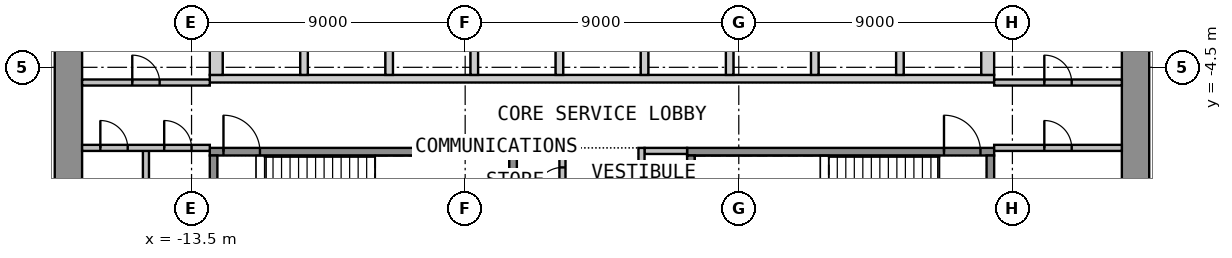
"""IFC4 building model, lengths in metres.
Left out: names, types, materials, properties, quantities, classifications, styles, units other than length and angle.
Written with IfcOpenShell. Run it as: python <this file> out.ifc"""

import sys

from ifc_helpers import new_model, si_unit, direction, frame, frame_2d, origin, place, context, subcontext, project, spatial, polyline, rectangle, outline, extrude, element, fill, save


model = new_model("IFC4")
c1 = context("Model", 3, precision=1e-05, world=origin(), true_north=direction((0.0, 1.0)))
c2 = subcontext(c1, "Body", "Model", "MODEL_VIEW")
j1 = project(units=[si_unit("LENGTHUNIT", "METRE"), si_unit("PLANEANGLEUNIT", "RADIAN")], contexts=[c1])
p1 = place(None, origin())
s1 = spatial("IfcSite", under=j1, at=p1, CompositionType="ELEMENT")
p2 = place(p1, origin())
s2 = spatial("IfcBuilding", under=s1, at=p2, CompositionType="ELEMENT")
p3 = place(p2, frame((0.0, 0.0, 10.8)))
s3 = spatial("IfcBuildingStorey", under=s2, at=p3, CompositionType="ELEMENT", Elevation=10.8)
p4 = place(p3, frame((-17.55, -12.6, 0.0), z_axis=(0.0, 0.0, 1.0), x_axis=(0.0, 1.0, 0.0)))
e1 = element("IfcWall", 1, at=p4, inside=s3, PredefinedType="SHEAR", context=c2, shape_type="SweptSolid", body=[
    extrude(rectangle(XDim=25.2, YDim=0.9, at=frame_2d((12.6, 0.0))), origin(), (0.0, 0.0, 1.0), 4.4),
])
p5 = place(p4, frame((11.4, 0.0, 0.0)))
e2 = element("IfcOpeningElement", 2, at=p5, cuts=e1, PredefinedType="OPENING", context=c2, shape_type="SweptSolid", body=[
    extrude(rectangle(XDim=2.4, YDim=2.1, at=frame_2d((1.2, 1.05))), frame((0.0, 0.46, 0.0), z_axis=(0.0, -1.0, 0.0), x_axis=(1.0, 0.0, 0.0)), (0.0, 0.0, 1.0), 0.92),
])
p6 = place(p3, frame((17.55, -12.6, 0.0), z_axis=(0.0, 0.0, 1.0), x_axis=(0.0, 1.0, 0.0)))
e3 = element("IfcWall", 3, at=p6, inside=s3, PredefinedType="SHEAR", context=c2, shape_type="SweptSolid", body=[
    extrude(rectangle(XDim=25.2, YDim=0.9, at=frame_2d((12.6, 0.0))), origin(), (0.0, 0.0, 1.0), 4.4),
])
p7 = place(p6, frame((11.4, 0.0, 0.0)))
e4 = element("IfcOpeningElement", 4, at=p7, cuts=e3, PredefinedType="OPENING", context=c2, shape_type="SweptSolid", body=[
    extrude(rectangle(XDim=2.4, YDim=2.1, at=frame_2d((1.2, 1.05))), frame((0.0, 0.46, 0.0), z_axis=(0.0, -1.0, 0.0), x_axis=(1.0, 0.0, 0.0)), (0.0, 0.0, 1.0), 0.92),
])
p8 = place(p3, origin())
e5 = element("IfcWall", 5, at=p8, inside=s3, PredefinedType="SHEAR", context=c2, shape_type="SweptSolid", body=[
    extrude(outline(polyline([(-12.9, -5.0), (12.9, -5.0), (12.9, -4.75), (-12.9, -4.75), (-12.9, -5.0)])), origin(), (0.0, 0.0, 1.0), 4.4),
])
p9 = place(p3, origin())
e6 = element("IfcWall", 6, at=p9, inside=s3, PredefinedType="SHEAR", context=c2, shape_type="SweptSolid", body=[
    extrude(outline(polyline([(-12.9, -4.75), (-12.475, -4.75), (-12.475, -2.05), (-12.9, -2.05), (-12.9, -4.75)])), origin(), (0.0, 0.0, 1.0), 4.4),
])
p10 = place(p3, origin())
e7 = element("IfcWall", 7, at=p10, inside=s3, PredefinedType="SHEAR", context=c2, shape_type="SweptSolid", body=[
    extrude(outline(polyline([(-9.925, -4.75), (-9.675, -4.75), (-9.675, -2.05), (-9.925, -2.05), (-9.925, -4.75)])), origin(), (0.0, 0.0, 1.0), 4.4),
])
p11 = place(p3, origin())
e8 = element("IfcWall", 8, at=p11, inside=s3, PredefinedType="SHEAR", context=c2, shape_type="SweptSolid", body=[
    extrude(outline(polyline([(-7.125, -4.75), (-6.875, -4.75), (-6.875, -2.05), (-7.125, -2.05), (-7.125, -4.75)])), origin(), (0.0, 0.0, 1.0), 4.4),
])
p12 = place(p3, origin())
e9 = element("IfcWall", 9, at=p12, inside=s3, PredefinedType="SHEAR", context=c2, shape_type="SweptSolid", body=[
    extrude(outline(polyline([(-4.325, -4.75), (-4.075, -4.75), (-4.075, -2.05), (-4.325, -2.05), (-4.325, -4.75)])), origin(), (0.0, 0.0, 1.0), 4.4),
])
p13 = place(p3, origin())
e10 = element("IfcWall", 10, at=p13, inside=s3, PredefinedType="SHEAR", context=c2, shape_type="SweptSolid", body=[
    extrude(outline(polyline([(-1.525, -4.75), (-1.275, -4.75), (-1.275, -2.05), (-1.525, -2.05), (-1.525, -4.75)])), origin(), (0.0, 0.0, 1.0), 4.4),
])
p14 = place(p3, origin())
e11 = element("IfcWall", 11, at=p14, inside=s3, PredefinedType="SHEAR", context=c2, shape_type="SweptSolid", body=[
    extrude(outline(polyline([(1.275, -4.75), (1.525, -4.75), (1.525, -2.05), (1.275, -2.05), (1.275, -4.75)])), origin(), (0.0, 0.0, 1.0), 4.4),
])
p15 = place(p3, origin())
e12 = element("IfcWall", 12, at=p15, inside=s3, PredefinedType="SHEAR", context=c2, shape_type="SweptSolid", body=[
    extrude(outline(polyline([(4.075, -4.75), (4.325, -4.75), (4.325, -2.05), (4.075, -2.05), (4.075, -4.75)])), origin(), (0.0, 0.0, 1.0), 4.4),
])
p16 = place(p3, origin())
e13 = element("IfcWall", 13, at=p16, inside=s3, PredefinedType="SHEAR", context=c2, shape_type="SweptSolid", body=[
    extrude(outline(polyline([(6.875, -4.75), (7.125, -4.75), (7.125, -2.05), (6.875, -2.05), (6.875, -4.75)])), origin(), (0.0, 0.0, 1.0), 4.4),
])
p17 = place(p3, origin())
e14 = element("IfcWall", 14, at=p17, inside=s3, PredefinedType="SHEAR", context=c2, shape_type="SweptSolid", body=[
    extrude(outline(polyline([(9.675, -4.75), (9.925, -4.75), (9.925, -2.05), (9.675, -2.05), (9.675, -4.75)])), origin(), (0.0, 0.0, 1.0), 4.4),
])
p18 = place(p3, origin())
e15 = element("IfcWall", 15, at=p18, inside=s3, PredefinedType="SHEAR", context=c2, shape_type="SweptSolid", body=[
    extrude(outline(polyline([(12.475, -4.75), (12.9, -4.75), (12.9, -2.05), (12.475, -2.05), (12.475, -4.75)])), origin(), (0.0, 0.0, 1.0), 4.4),
])
p19 = place(p3, frame((-12.9, -7.275, 0.0), z_axis=(0.0, 0.0, 1.0), x_axis=(1.0, 0.0, 0.0)))
e16 = element("IfcWall", 16, at=p19, inside=s3, PredefinedType="SHEAR", context=c2, shape_type="SweptSolid", body=[
    extrude(rectangle(XDim=10.1, YDim=0.25, at=frame_2d((5.05, 0.0))), origin(), (0.0, 0.0, 1.0), 4.4),
])
p20 = place(p19, frame((0.45, 0.0, 0.0)))
e17 = element("IfcOpeningElement", 17, at=p20, cuts=e16, PredefinedType="OPENING", context=c2, shape_type="SweptSolid", body=[
    extrude(rectangle(XDim=1.2, YDim=2.1, at=frame_2d((0.6, 1.05))), frame((0.0, 0.135, 0.0), z_axis=(0.0, -1.0, 0.0), x_axis=(1.0, 0.0, 0.0)), (0.0, 0.0, 1.0), 0.27),
])
for number, where, z_axis, x_axis in (
    (18, (-12.775, -10.65, 0.0), (0.0, 0.0, 1.0), (0.0, 1.0, 0.0)),
    (19, (-2.925, -10.65, 0.0), (0.0, 0.0, 1.0), (0.0, 1.0, 0.0)),
):
    element("IfcWall", number, at=place(p3, frame(where, z_axis=z_axis, x_axis=x_axis)), inside=s3, PredefinedType="SHEAR", context=c2, shape_type="SweptSolid", body=[
        extrude(rectangle(XDim=3.25, YDim=0.25, at=frame_2d((1.625, 0.0))), origin(), (0.0, 0.0, 1.0), 4.4),
    ])
p21 = place(p3, frame((2.8, -7.275, 0.0), z_axis=(0.0, 0.0, 1.0), x_axis=(1.0, 0.0, 0.0)))
e20 = element("IfcWall", 20, at=p21, inside=s3, PredefinedType="SHEAR", context=c2, shape_type="SweptSolid", body=[
    extrude(rectangle(XDim=10.1, YDim=0.25, at=frame_2d((5.05, 0.0))), origin(), (0.0, 0.0, 1.0), 4.4),
])
p22 = place(p21, frame((8.45, 0.0, 0.0)))
e21 = element("IfcOpeningElement", 21, at=p22, cuts=e20, PredefinedType="OPENING", context=c2, shape_type="SweptSolid", body=[
    extrude(rectangle(XDim=1.2, YDim=2.1, at=frame_2d((0.6, 1.05))), frame((0.0, 0.135, 0.0), z_axis=(0.0, -1.0, 0.0), x_axis=(1.0, 0.0, 0.0)), (0.0, 0.0, 1.0), 0.27),
])
for number, where, z_axis, x_axis in (
    (22, (2.925, -10.65, 0.0), (0.0, 0.0, 1.0), (0.0, 1.0, 0.0)),
    (23, (12.775, -10.65, 0.0), (0.0, 0.0, 1.0), (0.0, 1.0, 0.0)),
):
    element("IfcWall", number, at=place(p3, frame(where, z_axis=z_axis, x_axis=x_axis)), inside=s3, PredefinedType="SHEAR", context=c2, shape_type="SweptSolid", body=[
        extrude(rectangle(XDim=3.25, YDim=0.25, at=frame_2d((1.625, 0.0))), origin(), (0.0, 0.0, 1.0), 4.4),
    ])
for number, where, z_axis, x_axis in (
    (24, (-2.8, -7.25, 0.0), (0.0, 0.0, 1.0), (1.0, 0.0, 0.0)),
    (25, (1.4, -7.25, 0.0), (0.0, 0.0, 1.0), (1.0, 0.0, 0.0)),
):
    element("IfcWall", number, at=place(p3, frame(where, z_axis=z_axis, x_axis=x_axis)), inside=s3, PredefinedType="PARTITIONING", context=c2, shape_type="SweptSolid", body=[
        extrude(rectangle(XDim=1.4, YDim=0.2, at=frame_2d((0.7, 0.0))), origin(), (0.0, 0.0, 1.0), 4.4),
    ])
p23 = place(p3, frame((-1.3, -12.6, 0.0), z_axis=(0.0, 0.0, 1.0), x_axis=(0.0, 1.0, 0.0)))
e26 = element("IfcWall", 26, at=p23, inside=s3, PredefinedType="PARTITIONING", context=c2, shape_type="SweptSolid", body=[
    extrude(rectangle(XDim=5.45, YDim=0.2, at=frame_2d((2.725, 0.0))), origin(), (0.0, 0.0, 1.0), 4.4),
])
p24 = place(p23, frame((0.416, 0.0, 0.0)))
e27 = element("IfcOpeningElement", 27, at=p24, cuts=e26, PredefinedType="OPENING", context=c2, shape_type="SweptSolid", body=[
    extrude(rectangle(XDim=0.9, YDim=2.1, at=frame_2d((0.45, 1.05))), frame((0.0, 0.11, 0.0), z_axis=(0.0, -1.0, 0.0), x_axis=(1.0, 0.0, 0.0)), (0.0, 0.0, 1.0), 0.22),
])
p25 = place(p23, frame((2.149, 0.0, 0.0)))
e28 = element("IfcOpeningElement", 28, at=p25, cuts=e26, PredefinedType="OPENING", context=c2, shape_type="SweptSolid", body=[
    extrude(rectangle(XDim=0.9, YDim=2.1, at=frame_2d((0.45, 1.05))), frame((0.0, 0.11, 0.0), z_axis=(0.0, -1.0, 0.0), x_axis=(1.0, 0.0, 0.0)), (0.0, 0.0, 1.0), 0.22),
])
p26 = place(p23, frame((3.907, 0.0, 0.0)))
e29 = element("IfcOpeningElement", 29, at=p26, cuts=e26, PredefinedType="OPENING", context=c2, shape_type="SweptSolid", body=[
    extrude(rectangle(XDim=0.9, YDim=2.1, at=frame_2d((0.45, 1.05))), frame((0.0, 0.11, 0.0), z_axis=(0.0, -1.0, 0.0), x_axis=(1.0, 0.0, 0.0)), (0.0, 0.0, 1.0), 0.22),
])
p27 = place(p3, frame((1.3, -12.6, 0.0), z_axis=(0.0, 0.0, 1.0), x_axis=(0.0, 1.0, 0.0)))
e30 = element("IfcWall", 30, at=p27, inside=s3, PredefinedType="PARTITIONING", context=c2, shape_type="SweptSolid", body=[
    extrude(rectangle(XDim=5.45, YDim=0.2, at=frame_2d((2.725, 0.0))), origin(), (0.0, 0.0, 1.0), 4.4),
])
p28 = place(p27, frame((0.337, 0.0, 0.0)))
e31 = element("IfcOpeningElement", 31, at=p28, cuts=e30, PredefinedType="OPENING", context=c2, shape_type="SweptSolid", body=[
    extrude(rectangle(XDim=0.9, YDim=2.1, at=frame_2d((0.45, 1.05))), frame((0.0, 0.11, 0.0), z_axis=(0.0, -1.0, 0.0), x_axis=(1.0, 0.0, 0.0)), (0.0, 0.0, 1.0), 0.22),
])
p29 = place(p27, frame((2.962, 0.0, 0.0)))
e32 = element("IfcOpeningElement", 32, at=p29, cuts=e30, PredefinedType="OPENING", context=c2, shape_type="SweptSolid", body=[
    extrude(rectangle(XDim=0.9, YDim=2.1, at=frame_2d((0.45, 1.05))), frame((0.0, 0.11, 0.0), z_axis=(0.0, -1.0, 0.0), x_axis=(1.0, 0.0, 0.0)), (0.0, 0.0, 1.0), 0.22),
])
p30 = place(p3, frame((-15.0, -12.6, 0.0), z_axis=(0.0, 0.0, 1.0), x_axis=(0.0, 1.0, 0.0)))
e33 = element("IfcWall", 33, at=p30, inside=s3, PredefinedType="PARTITIONING", context=c2, shape_type="SweptSolid", body=[
    extrude(rectangle(XDim=5.45, YDim=0.2, at=frame_2d((2.725, 0.0))), origin(), (0.0, 0.0, 1.0), 4.4),
])
p31 = place(p3, frame((-17.1, -7.15, 0.0), z_axis=(0.0, 0.0, 1.0), x_axis=(1.0, 0.0, 0.0)))
e34 = element("IfcWall", 34, at=p31, inside=s3, PredefinedType="PARTITIONING", context=c2, shape_type="SweptSolid", body=[
    extrude(rectangle(XDim=4.2, YDim=0.2, at=frame_2d((2.1, 0.0))), origin(), (0.0, 0.0, 1.0), 4.4),
])
p32 = place(p31, frame((0.6, 0.0, 0.0)))
e35 = element("IfcOpeningElement", 35, at=p32, cuts=e34, PredefinedType="OPENING", context=c2, shape_type="SweptSolid", body=[
    extrude(rectangle(XDim=0.9, YDim=2.1, at=frame_2d((0.45, 1.05))), frame((0.0, 0.11, 0.0), z_axis=(0.0, -1.0, 0.0), x_axis=(1.0, 0.0, 0.0)), (0.0, 0.0, 1.0), 0.22),
])
p33 = place(p31, frame((2.7, 0.0, 0.0)))
e36 = element("IfcOpeningElement", 36, at=p33, cuts=e34, PredefinedType="OPENING", context=c2, shape_type="SweptSolid", body=[
    extrude(rectangle(XDim=0.9, YDim=2.1, at=frame_2d((0.45, 1.05))), frame((0.0, 0.11, 0.0), z_axis=(0.0, -1.0, 0.0), x_axis=(1.0, 0.0, 0.0)), (0.0, 0.0, 1.0), 0.22),
])
p34 = place(p3, frame((-17.1, -5.0, 0.0), z_axis=(0.0, 0.0, 1.0), x_axis=(1.0, 0.0, 0.0)))
e37 = element("IfcWall", 37, at=p34, inside=s3, PredefinedType="PARTITIONING", context=c2, shape_type="SweptSolid", body=[
    extrude(rectangle(XDim=4.2, YDim=0.2, at=frame_2d((2.1, 0.0))), origin(), (0.0, 0.0, 1.0), 4.4),
])
p35 = place(p34, frame((1.65, 0.0, 0.0)))
e38 = element("IfcOpeningElement", 38, at=p35, cuts=e37, PredefinedType="OPENING", context=c2, shape_type="SweptSolid", body=[
    extrude(rectangle(XDim=0.9, YDim=2.1, at=frame_2d((0.45, 1.05))), frame((0.0, 0.11, 0.0), z_axis=(0.0, -1.0, 0.0), x_axis=(1.0, 0.0, 0.0)), (0.0, 0.0, 1.0), 0.22),
])
p36 = place(p3, frame((12.9, -7.15, 0.0), z_axis=(0.0, 0.0, 1.0), x_axis=(1.0, 0.0, 0.0)))
e39 = element("IfcWall", 39, at=p36, inside=s3, PredefinedType="PARTITIONING", context=c2, shape_type="SweptSolid", body=[
    extrude(rectangle(XDim=4.2, YDim=0.2, at=frame_2d((2.1, 0.0))), origin(), (0.0, 0.0, 1.0), 4.4),
])
p37 = place(p36, frame((1.65, 0.0, 0.0)))
e40 = element("IfcOpeningElement", 40, at=p37, cuts=e39, PredefinedType="OPENING", context=c2, shape_type="SweptSolid", body=[
    extrude(rectangle(XDim=0.9, YDim=2.1, at=frame_2d((0.45, 1.05))), frame((0.0, 0.11, 0.0), z_axis=(0.0, -1.0, 0.0), x_axis=(1.0, 0.0, 0.0)), (0.0, 0.0, 1.0), 0.22),
])
p38 = place(p3, frame((12.9, -5.0, 0.0), z_axis=(0.0, 0.0, 1.0), x_axis=(1.0, 0.0, 0.0)))
e41 = element("IfcWall", 41, at=p38, inside=s3, PredefinedType="PARTITIONING", context=c2, shape_type="SweptSolid", body=[
    extrude(rectangle(XDim=4.2, YDim=0.2, at=frame_2d((2.1, 0.0))), origin(), (0.0, 0.0, 1.0), 4.4),
])
p39 = place(p38, frame((1.65, 0.0, 0.0)))
e42 = element("IfcOpeningElement", 42, at=p39, cuts=e41, PredefinedType="OPENING", context=c2, shape_type="SweptSolid", body=[
    extrude(rectangle(XDim=0.9, YDim=2.1, at=frame_2d((0.45, 1.05))), frame((0.0, 0.11, 0.0), z_axis=(0.0, -1.0, 0.0), x_axis=(1.0, 0.0, 0.0)), (0.0, 0.0, 1.0), 0.22),
])
p40 = place(p20, origin())
e43 = element("IfcDoor", 43, at=p40, inside=s3, OperationType="SINGLE_SWING_LEFT", PredefinedType="DOOR", context=c2, shape_type="SweptSolid", body=[
    extrude(rectangle(XDim=1.2, YDim=2.1, at=frame_2d((0.6, 1.05))), frame((0.0, 0.025, 0.0), z_axis=(0.0, -1.0, 0.0), x_axis=(1.0, 0.0, 0.0)), (0.0, 0.0, 1.0), 0.05),
])
fill(e17, e43)
p41 = place(p22, origin())
e44 = element("IfcDoor", 44, at=p41, inside=s3, OperationType="SINGLE_SWING_LEFT", PredefinedType="DOOR", context=c2, shape_type="SweptSolid", body=[
    extrude(rectangle(XDim=1.2, YDim=2.1, at=frame_2d((0.6, 1.05))), frame((0.0, 0.025, 0.0), z_axis=(0.0, -1.0, 0.0), x_axis=(1.0, 0.0, 0.0)), (0.0, 0.0, 1.0), 0.05),
])
fill(e21, e44)
p42 = place(p26, origin())
e45 = element("IfcDoor", 45, at=p42, inside=s3, OperationType="SINGLE_SWING_LEFT", PredefinedType="DOOR", context=c2, shape_type="SweptSolid", body=[
    extrude(rectangle(XDim=0.9, YDim=2.1, at=frame_2d((0.45, 1.05))), frame((0.0, 0.025, 0.0), z_axis=(0.0, -1.0, 0.0), x_axis=(1.0, 0.0, 0.0)), (0.0, 0.0, 1.0), 0.05),
])
fill(e29, e45)
p43 = place(p32, origin())
e46 = element("IfcDoor", 46, at=p43, inside=s3, OperationType="SINGLE_SWING_LEFT", PredefinedType="DOOR", context=c2, shape_type="SweptSolid", body=[
    extrude(rectangle(XDim=0.9, YDim=2.1, at=frame_2d((0.45, 1.05))), frame((0.0, 0.025, 0.0), z_axis=(0.0, -1.0, 0.0), x_axis=(1.0, 0.0, 0.0)), (0.0, 0.0, 1.0), 0.05),
])
fill(e35, e46)
p44 = place(p33, origin())
e47 = element("IfcDoor", 47, at=p44, inside=s3, OperationType="SINGLE_SWING_LEFT", PredefinedType="DOOR", context=c2, shape_type="SweptSolid", body=[
    extrude(rectangle(XDim=0.9, YDim=2.1, at=frame_2d((0.45, 1.05))), frame((0.0, 0.025, 0.0), z_axis=(0.0, -1.0, 0.0), x_axis=(1.0, 0.0, 0.0)), (0.0, 0.0, 1.0), 0.05),
])
fill(e36, e47)
p45 = place(p35, origin())
e48 = element("IfcDoor", 48, at=p45, inside=s3, OperationType="SINGLE_SWING_LEFT", PredefinedType="DOOR", context=c2, shape_type="SweptSolid", body=[
    extrude(rectangle(XDim=0.9, YDim=2.1, at=frame_2d((0.45, 1.05))), frame((0.0, 0.025, 0.0), z_axis=(0.0, -1.0, 0.0), x_axis=(1.0, 0.0, 0.0)), (0.0, 0.0, 1.0), 0.05),
])
fill(e38, e48)
p46 = place(p37, origin())
e49 = element("IfcDoor", 49, at=p46, inside=s3, OperationType="SINGLE_SWING_LEFT", PredefinedType="DOOR", context=c2, shape_type="SweptSolid", body=[
    extrude(rectangle(XDim=0.9, YDim=2.1, at=frame_2d((0.45, 1.05))), frame((0.0, 0.025, 0.0), z_axis=(0.0, -1.0, 0.0), x_axis=(1.0, 0.0, 0.0)), (0.0, 0.0, 1.0), 0.05),
])
fill(e40, e49)
p47 = place(p39, origin())
e50 = element("IfcDoor", 50, at=p47, inside=s3, OperationType="SINGLE_SWING_LEFT", PredefinedType="DOOR", context=c2, shape_type="SweptSolid", body=[
    extrude(rectangle(XDim=0.9, YDim=2.1, at=frame_2d((0.45, 1.05))), frame((0.0, 0.025, 0.0), z_axis=(0.0, -1.0, 0.0), x_axis=(1.0, 0.0, 0.0)), (0.0, 0.0, 1.0), 0.05),
])
fill(e42, e50)
save(model, sys.argv[1])
